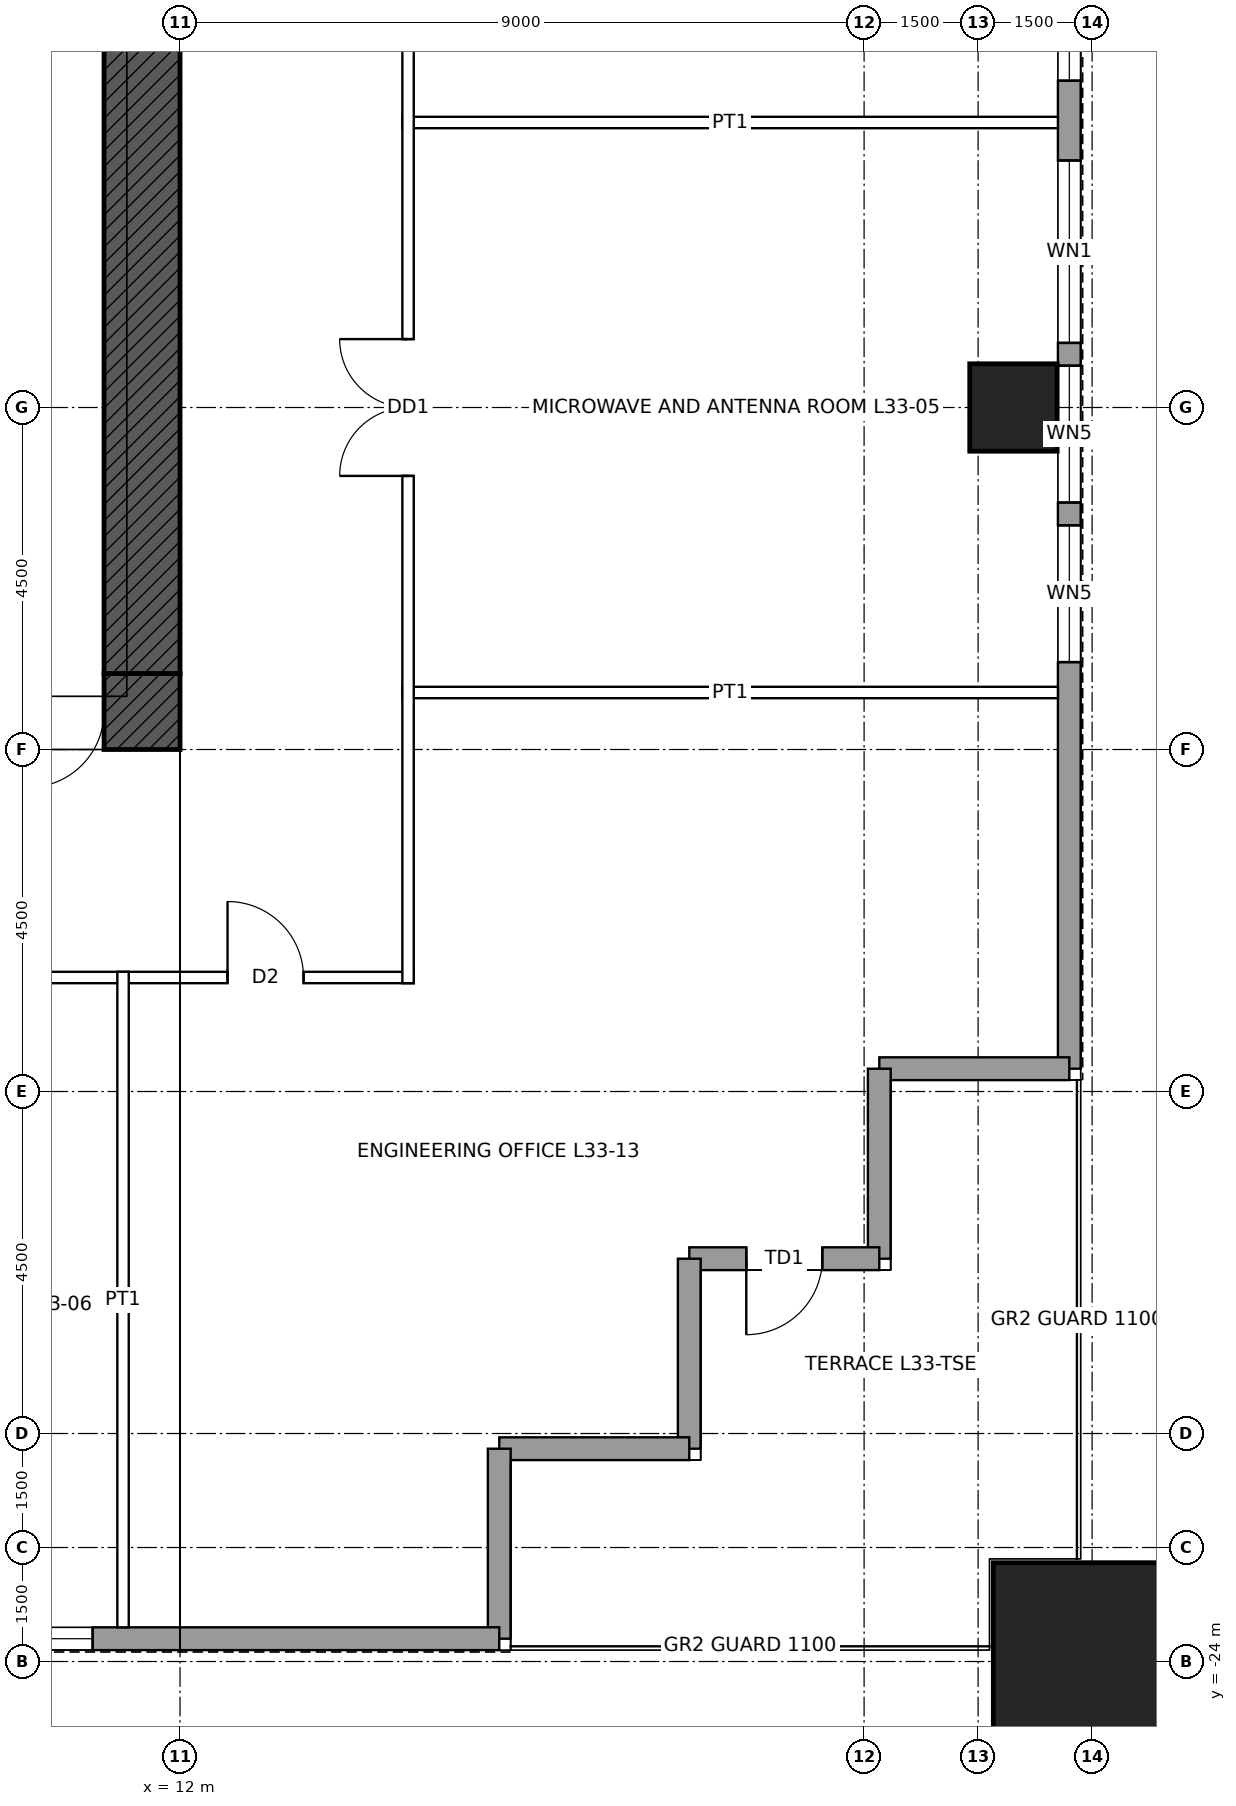
"""IFC4 building model, lengths in metres.
Left out: names, types, materials, properties, quantities, classifications, styles, units other than length and angle.
Written with IfcOpenShell. Run it as: python <this file> out.ifc"""

import sys

from ifc_helpers import new_model, si_unit, direction, frame, frame_2d, origin, origin_2d, place, context, subcontext, project, spatial, rectangle, hollow_rectangle, extrude, element, fill, save


model = new_model("IFC4")
c1 = context("Model", 3, precision=1e-05, world=origin(), true_north=direction((0.0, 1.0)))
c2 = subcontext(c1, "Body", "Model", "MODEL_VIEW")
j1 = project(units=[si_unit("LENGTHUNIT", "METRE"), si_unit("PLANEANGLEUNIT", "RADIAN")], contexts=[c1])
p1 = place(None, origin())
s1 = spatial("IfcSite", under=j1, at=p1, CompositionType="ELEMENT")
p2 = place(p1, origin())
s2 = spatial("IfcBuilding", under=s1, at=p2, CompositionType="ELEMENT")
p3 = place(p2, frame((0.0, 0.0, 162.9)))
s3 = spatial("IfcBuildingStorey", under=s2, at=p3, CompositionType="ELEMENT", Elevation=162.9)
p4 = place(p3, frame((24.0, -24.0, 0.0), z_axis=(0.0, 0.0, 1.0), x_axis=(1.0, 0.0, 0.0)))
e1 = element("IfcColumn", 1, at=p4, inside=s3, PredefinedType="COLUMN", context=c2, shape_type="SweptSolid", body=[
    extrude(hollow_rectangle(XDim=2.6, YDim=2.6, WallThickness=0.13, at=origin_2d()), origin(), (0.0, 0.0, 1.0), 4.5),
])
p5 = place(p3, frame((22.965, -7.5, 0.0), z_axis=(0.0, 0.0, 1.0), x_axis=(1.0, 0.0, 0.0)))
e2 = element("IfcColumn", 2, at=p5, inside=s3, PredefinedType="COLUMN", context=c2, shape_type="SweptSolid", body=[
    extrude(hollow_rectangle(XDim=1.15, YDim=1.15, WallThickness=0.075, at=origin_2d()), origin(), (0.0, 0.0, 1.0), 4.5),
])
p6 = place(p3, frame((12.0, -11.5, 0.0), z_axis=(0.0, 0.0, 1.0), x_axis=(-1.0, 0.0, 0.0)))
e3 = element("IfcWall", 3, at=p6, inside=s3, PredefinedType="SHEAR", context=c2, shape_type="SweptSolid", body=[
    extrude(rectangle(XDim=24.0, YDim=1.0, at=frame_2d((12.0, 0.0))), origin(), (0.0, 0.0, 1.0), 4.5),
])
p7 = place(p6, frame((11.5, 0.0, 0.0)))
e4 = element("IfcOpeningElement", 4, at=p7, cuts=e3, PredefinedType="OPENING", context=c2, shape_type="SweptSolid", body=[
    extrude(rectangle(XDim=1.0, YDim=2.1, at=frame_2d((0.5, 1.05))), frame((0.0, 0.51, 0.0), z_axis=(0.0, -1.0, 0.0), x_axis=(1.0, 0.0, 0.0)), (0.0, 0.0, 1.0), 1.02),
])
p8 = place(p6, frame((1.0, 0.0, 0.0)))
e5 = element("IfcOpeningElement", 5, at=p8, cuts=e3, PredefinedType="OPENING", context=c2, shape_type="SweptSolid", body=[
    extrude(rectangle(XDim=1.0, YDim=2.4, at=frame_2d((0.5, 1.2))), frame((0.0, 0.51, 0.0), z_axis=(0.0, -1.0, 0.0), x_axis=(1.0, 0.0, 0.0)), (0.0, 0.0, 1.0), 1.02),
])
p9 = place(p3, frame((11.5, 11.0, 0.0), z_axis=(0.0, 0.0, 1.0), x_axis=(0.0, -1.0, 0.0)))
e6 = element("IfcWall", 6, at=p9, inside=s3, PredefinedType="SHEAR", context=c2, shape_type="SweptSolid", body=[
    extrude(rectangle(XDim=22.0, YDim=1.0, at=frame_2d((11.0, 0.0))), origin(), (0.0, 0.0, 1.0), 4.5),
])
p10 = place(p9, frame((10.5, 0.0, 0.0)))
e7 = element("IfcOpeningElement", 7, at=p10, cuts=e6, PredefinedType="OPENING", context=c2, shape_type="SweptSolid", body=[
    extrude(rectangle(XDim=1.0, YDim=2.4, at=frame_2d((0.5, 1.2))), frame((0.0, 0.51, 0.0), z_axis=(0.0, -1.0, 0.0), x_axis=(1.0, 0.0, 0.0)), (0.0, 0.0, 1.0), 1.02),
])
p11 = place(p3, frame((23.7, 16.2, 0.0), z_axis=(0.0, 0.0, 1.0), x_axis=(0.0, -1.0, 0.0)))
e8 = element("IfcWall", 8, at=p11, inside=s3, PredefinedType="SOLIDWALL", context=c2, shape_type="SweptSolid", body=[
    extrude(rectangle(XDim=32.4, YDim=0.3, at=frame_2d((16.2, 0.0))), origin(), (0.0, 0.0, 1.0), 4.3),
])
p12 = place(p11, frame((5.35, 0.0, 1.0)))
e9 = element("IfcOpeningElement", 9, at=p12, cuts=e8, PredefinedType="OPENING", context=c2, shape_type="SweptSolid", body=[
    extrude(rectangle(XDim=1.8, YDim=1.2, at=frame_2d((0.9, 0.6))), frame((0.0, 0.16, 0.0), z_axis=(0.0, -1.0, 0.0), x_axis=(1.0, 0.0, 0.0)), (0.0, 0.0, 1.0), 0.32),
])
p13 = place(p11, frame((7.45, 0.0, 1.0)))
e10 = element("IfcOpeningElement", 10, at=p13, cuts=e8, PredefinedType="OPENING", context=c2, shape_type="SweptSolid", body=[
    extrude(rectangle(XDim=2.4, YDim=1.2, at=frame_2d((1.2, 0.6))), frame((0.0, 0.16, 0.0), z_axis=(0.0, -1.0, 0.0), x_axis=(1.0, 0.0, 0.0)), (0.0, 0.0, 1.0), 0.32),
])
p14 = place(p11, frame((10.15, 0.0, 1.0)))
e11 = element("IfcOpeningElement", 11, at=p14, cuts=e8, PredefinedType="OPENING", context=c2, shape_type="SweptSolid", body=[
    extrude(rectangle(XDim=2.4, YDim=1.2, at=frame_2d((1.2, 0.6))), frame((0.0, 0.16, 0.0), z_axis=(0.0, -1.0, 0.0), x_axis=(1.0, 0.0, 0.0)), (0.0, 0.0, 1.0), 0.32),
])
p15 = place(p11, frame((13.0, 0.0, 1.0)))
e12 = element("IfcOpeningElement", 12, at=p15, cuts=e8, PredefinedType="OPENING", context=c2, shape_type="SweptSolid", body=[
    extrude(rectangle(XDim=2.4, YDim=1.2, at=frame_2d((1.2, 0.6))), frame((0.0, 0.16, 0.0), z_axis=(0.0, -1.0, 0.0), x_axis=(1.0, 0.0, 0.0)), (0.0, 0.0, 1.0), 0.32),
])
p16 = place(p11, frame((17.0, 0.0, 1.0)))
e13 = element("IfcOpeningElement", 13, at=p16, cuts=e8, PredefinedType="OPENING", context=c2, shape_type="SweptSolid", body=[
    extrude(rectangle(XDim=2.4, YDim=1.2, at=frame_2d((1.2, 0.6))), frame((0.0, 0.16, 0.0), z_axis=(0.0, -1.0, 0.0), x_axis=(1.0, 0.0, 0.0)), (0.0, 0.0, 1.0), 0.32),
])
p17 = place(p11, frame((20.45, 0.0, 1.0)))
e14 = element("IfcOpeningElement", 14, at=p17, cuts=e8, PredefinedType="OPENING", context=c2, shape_type="SweptSolid", body=[
    extrude(rectangle(XDim=2.4, YDim=1.2, at=frame_2d((1.2, 0.6))), frame((0.0, 0.16, 0.0), z_axis=(0.0, -1.0, 0.0), x_axis=(1.0, 0.0, 0.0)), (0.0, 0.0, 1.0), 0.32),
])
p18 = place(p11, frame((23.15, 0.0, 1.0)))
e15 = element("IfcOpeningElement", 15, at=p18, cuts=e8, PredefinedType="OPENING", context=c2, shape_type="SweptSolid", body=[
    extrude(rectangle(XDim=1.8, YDim=1.2, at=frame_2d((0.9, 0.6))), frame((0.0, 0.16, 0.0), z_axis=(0.0, -1.0, 0.0), x_axis=(1.0, 0.0, 0.0)), (0.0, 0.0, 1.0), 0.32),
])
p19 = place(p11, frame((25.25, 0.0, 1.0)))
e16 = element("IfcOpeningElement", 16, at=p19, cuts=e8, PredefinedType="OPENING", context=c2, shape_type="SweptSolid", body=[
    extrude(rectangle(XDim=1.8, YDim=1.2, at=frame_2d((0.9, 0.6))), frame((0.0, 0.16, 0.0), z_axis=(0.0, -1.0, 0.0), x_axis=(1.0, 0.0, 0.0)), (0.0, 0.0, 1.0), 0.32),
])
for number, where, z_axis, x_axis in (
    (17, (23.7, -16.2, 0.0), (0.0, 0.0, 1.0), (-1.0, 0.0, 0.0)),
    (18, (21.2, -16.2, 0.0), (0.0, 0.0, 1.0), (0.0, -1.0, 0.0)),
):
    element("IfcWall", number, at=place(p3, frame(where, z_axis=z_axis, x_axis=x_axis)), inside=s3, PredefinedType="SOLIDWALL", context=c2, shape_type="SweptSolid", body=[
        extrude(rectangle(XDim=2.5, YDim=0.3, at=frame_2d((1.25, 0.0))), origin(), (0.0, 0.0, 1.0), 4.3),
    ])
p20 = place(p3, frame((21.2, -18.7, 0.0), z_axis=(0.0, 0.0, 1.0), x_axis=(-1.0, 0.0, 0.0)))
e19 = element("IfcWall", 19, at=p20, inside=s3, PredefinedType="SOLIDWALL", context=c2, shape_type="SweptSolid", body=[
    extrude(rectangle(XDim=2.5, YDim=0.3, at=frame_2d((1.25, 0.0))), origin(), (0.0, 0.0, 1.0), 4.3),
])
p21 = place(p20, frame((0.75, 0.0, 0.0)))
e20 = element("IfcOpeningElement", 20, at=p21, cuts=e19, PredefinedType="OPENING", context=c2, shape_type="SweptSolid", body=[
    extrude(rectangle(XDim=1.0, YDim=2.4, at=frame_2d((0.5, 1.2))), frame((0.0, 0.16, 0.0), z_axis=(0.0, -1.0, 0.0), x_axis=(1.0, 0.0, 0.0)), (0.0, 0.0, 1.0), 0.32),
])
for number, where, z_axis, x_axis in (
    (21, (18.7, -18.7, 0.0), (0.0, 0.0, 1.0), (0.0, -1.0, 0.0)),
    (22, (18.7, -21.2, 0.0), (0.0, 0.0, 1.0), (-1.0, 0.0, 0.0)),
    (23, (16.2, -21.2, 0.0), (0.0, 0.0, 1.0), (0.0, -1.0, 0.0)),
):
    element("IfcWall", number, at=place(p3, frame(where, z_axis=z_axis, x_axis=x_axis)), inside=s3, PredefinedType="SOLIDWALL", context=c2, shape_type="SweptSolid", body=[
        extrude(rectangle(XDim=2.5, YDim=0.3, at=frame_2d((1.25, 0.0))), origin(), (0.0, 0.0, 1.0), 4.3),
    ])
p22 = place(p3, frame((16.2, -23.7, 0.0), z_axis=(0.0, 0.0, 1.0), x_axis=(-1.0, 0.0, 0.0)))
e24 = element("IfcWall", 24, at=p22, inside=s3, PredefinedType="SOLIDWALL", context=c2, shape_type="SweptSolid", body=[
    extrude(rectangle(XDim=32.4, YDim=0.3, at=frame_2d((16.2, 0.0))), origin(), (0.0, 0.0, 1.0), 4.3),
])
p23 = place(p22, frame((5.35, 0.0, 1.0)))
e25 = element("IfcOpeningElement", 25, at=p23, cuts=e24, PredefinedType="OPENING", context=c2, shape_type="SweptSolid", body=[
    extrude(rectangle(XDim=1.8, YDim=1.2, at=frame_2d((0.9, 0.6))), frame((0.0, 0.16, 0.0), z_axis=(0.0, -1.0, 0.0), x_axis=(1.0, 0.0, 0.0)), (0.0, 0.0, 1.0), 0.32),
])
p24 = place(p22, frame((7.45, 0.0, 1.0)))
e26 = element("IfcOpeningElement", 26, at=p24, cuts=e24, PredefinedType="OPENING", context=c2, shape_type="SweptSolid", body=[
    extrude(rectangle(XDim=1.8, YDim=1.2, at=frame_2d((0.9, 0.6))), frame((0.0, 0.16, 0.0), z_axis=(0.0, -1.0, 0.0), x_axis=(1.0, 0.0, 0.0)), (0.0, 0.0, 1.0), 0.32),
])
p25 = place(p22, frame((9.55, 0.0, 1.0)))
e27 = element("IfcOpeningElement", 27, at=p25, cuts=e24, PredefinedType="OPENING", context=c2, shape_type="SweptSolid", body=[
    extrude(rectangle(XDim=2.4, YDim=1.2, at=frame_2d((1.2, 0.6))), frame((0.0, 0.16, 0.0), z_axis=(0.0, -1.0, 0.0), x_axis=(1.0, 0.0, 0.0)), (0.0, 0.0, 1.0), 0.32),
])
p26 = place(p22, frame((13.0, 0.0, 1.0)))
e28 = element("IfcOpeningElement", 28, at=p26, cuts=e24, PredefinedType="OPENING", context=c2, shape_type="SweptSolid", body=[
    extrude(rectangle(XDim=2.4, YDim=1.2, at=frame_2d((1.2, 0.6))), frame((0.0, 0.16, 0.0), z_axis=(0.0, -1.0, 0.0), x_axis=(1.0, 0.0, 0.0)), (0.0, 0.0, 1.0), 0.32),
])
p27 = place(p22, frame((17.0, 0.0, 1.0)))
e29 = element("IfcOpeningElement", 29, at=p27, cuts=e24, PredefinedType="OPENING", context=c2, shape_type="SweptSolid", body=[
    extrude(rectangle(XDim=2.4, YDim=1.2, at=frame_2d((1.2, 0.6))), frame((0.0, 0.16, 0.0), z_axis=(0.0, -1.0, 0.0), x_axis=(1.0, 0.0, 0.0)), (0.0, 0.0, 1.0), 0.32),
])
p28 = place(p22, frame((20.45, 0.0, 1.0)))
e30 = element("IfcOpeningElement", 30, at=p28, cuts=e24, PredefinedType="OPENING", context=c2, shape_type="SweptSolid", body=[
    extrude(rectangle(XDim=2.4, YDim=1.2, at=frame_2d((1.2, 0.6))), frame((0.0, 0.16, 0.0), z_axis=(0.0, -1.0, 0.0), x_axis=(1.0, 0.0, 0.0)), (0.0, 0.0, 1.0), 0.32),
])
p29 = place(p22, frame((23.15, 0.0, 1.0)))
e31 = element("IfcOpeningElement", 31, at=p29, cuts=e24, PredefinedType="OPENING", context=c2, shape_type="SweptSolid", body=[
    extrude(rectangle(XDim=1.8, YDim=1.2, at=frame_2d((0.9, 0.6))), frame((0.0, 0.16, 0.0), z_axis=(0.0, -1.0, 0.0), x_axis=(1.0, 0.0, 0.0)), (0.0, 0.0, 1.0), 0.32),
])
p30 = place(p22, frame((25.25, 0.0, 1.0)))
e32 = element("IfcOpeningElement", 32, at=p30, cuts=e24, PredefinedType="OPENING", context=c2, shape_type="SweptSolid", body=[
    extrude(rectangle(XDim=1.8, YDim=1.2, at=frame_2d((0.9, 0.6))), frame((0.0, 0.16, 0.0), z_axis=(0.0, -1.0, 0.0), x_axis=(1.0, 0.0, 0.0)), (0.0, 0.0, 1.0), 0.32),
])
p31 = place(p3, frame((-15.075, -15.0, 0.0), z_axis=(0.0, 0.0, 1.0), x_axis=(1.0, 0.0, 0.0)))
e33 = element("IfcWall", 33, at=p31, inside=s3, PredefinedType="PARTITIONING", context=c2, shape_type="SweptSolid", body=[
    extrude(rectangle(XDim=30.15, YDim=0.15, at=frame_2d((15.075, 0.0))), origin(), (0.0, 0.0, 1.0), 4.3),
])
p32 = place(p31, frame((21.675, 0.0, 0.0)))
e34 = element("IfcOpeningElement", 34, at=p32, cuts=e33, PredefinedType="OPENING", context=c2, shape_type="SweptSolid", body=[
    extrude(rectangle(XDim=1.8, YDim=2.4, at=frame_2d((0.9, 1.2))), frame((0.0, 0.085, 0.0), z_axis=(0.0, -1.0, 0.0), x_axis=(1.0, 0.0, 0.0)), (0.0, 0.0, 1.0), 0.17),
])
p33 = place(p31, frame((14.575, 0.0, 0.0)))
e35 = element("IfcOpeningElement", 35, at=p33, cuts=e33, PredefinedType="OPENING", context=c2, shape_type="SweptSolid", body=[
    extrude(rectangle(XDim=1.0, YDim=2.1, at=frame_2d((0.5, 1.05))), frame((0.0, 0.085, 0.0), z_axis=(0.0, -1.0, 0.0), x_axis=(1.0, 0.0, 0.0)), (0.0, 0.0, 1.0), 0.17),
])
p34 = place(p31, frame((6.675, 0.0, 0.0)))
e36 = element("IfcOpeningElement", 36, at=p34, cuts=e33, PredefinedType="OPENING", context=c2, shape_type="SweptSolid", body=[
    extrude(rectangle(XDim=1.8, YDim=2.4, at=frame_2d((0.9, 1.2))), frame((0.0, 0.085, 0.0), z_axis=(0.0, -1.0, 0.0), x_axis=(1.0, 0.0, 0.0)), (0.0, 0.0, 1.0), 0.17),
])
p35 = place(p31, frame((27.7, 0.0, 0.0)))
e37 = element("IfcOpeningElement", 37, at=p35, cuts=e33, PredefinedType="OPENING", context=c2, shape_type="SweptSolid", body=[
    extrude(rectangle(XDim=1.0, YDim=2.1, at=frame_2d((0.5, 1.05))), frame((0.0, 0.085, 0.0), z_axis=(0.0, -1.0, 0.0), x_axis=(1.0, 0.0, 0.0)), (0.0, 0.0, 1.0), 0.17),
])
p36 = place(p31, frame((1.45, 0.0, 0.0)))
e38 = element("IfcOpeningElement", 38, at=p36, cuts=e33, PredefinedType="OPENING", context=c2, shape_type="SweptSolid", body=[
    extrude(rectangle(XDim=1.0, YDim=2.1, at=frame_2d((0.5, 1.05))), frame((0.0, 0.085, 0.0), z_axis=(0.0, -1.0, 0.0), x_axis=(1.0, 0.0, 0.0)), (0.0, 0.0, 1.0), 0.17),
])
for number, where, z_axis, x_axis in (
    (39, (14.925, -11.25, 0.0), (0.0, 0.0, 1.0), (1.0, 0.0, 0.0)),
    (40, (14.925, -3.75, 0.0), (0.0, 0.0, 1.0), (1.0, 0.0, 0.0)),
    (41, (11.25, -23.55, 0.0), (0.0, 0.0, 1.0), (0.0, 1.0, 0.0)),
):
    element("IfcWall", number, at=place(p3, frame(where, z_axis=z_axis, x_axis=x_axis)), inside=s3, PredefinedType="PARTITIONING", context=c2, shape_type="SweptSolid", body=[
        extrude(rectangle(XDim=8.625, YDim=0.15, at=frame_2d((4.312, 0.0))), origin(), (0.0, 0.0, 1.0), 3.431),
    ])
p37 = place(p3, frame((15.0, -15.075, 0.0), z_axis=(0.0, 0.0, 1.0), x_axis=(0.0, 1.0, 0.0)))
e42 = element("IfcWall", 42, at=p37, inside=s3, PredefinedType="PARTITIONING", context=c2, shape_type="SweptSolid", body=[
    extrude(rectangle(XDim=30.15, YDim=0.15, at=frame_2d((15.075, 0.0))), origin(), (0.0, 0.0, 1.0), 4.3),
])
p38 = place(p37, frame((17.925, 0.0, 0.0)))
e43 = element("IfcOpeningElement", 43, at=p38, cuts=e42, PredefinedType="OPENING", context=c2, shape_type="SweptSolid", body=[
    extrude(rectangle(XDim=1.8, YDim=2.4, at=frame_2d((0.9, 1.2))), frame((0.0, 0.085, 0.0), z_axis=(0.0, -1.0, 0.0), x_axis=(1.0, 0.0, 0.0)), (0.0, 0.0, 1.0), 0.17),
])
p39 = place(p37, frame((6.675, 0.0, 0.0)))
e44 = element("IfcOpeningElement", 44, at=p39, cuts=e42, PredefinedType="OPENING", context=c2, shape_type="SweptSolid", body=[
    extrude(rectangle(XDim=1.8, YDim=2.4, at=frame_2d((0.9, 1.2))), frame((0.0, 0.085, 0.0), z_axis=(0.0, -1.0, 0.0), x_axis=(1.0, 0.0, 0.0)), (0.0, 0.0, 1.0), 0.17),
])
p40 = place(p16, origin())
e45 = element("IfcWindow", 45, at=p40, inside=s3, PartitioningType="SINGLE_PANEL", PredefinedType="WINDOW", context=c2, shape_type="SweptSolid", body=[
    extrude(rectangle(XDim=2.4, YDim=1.2, at=frame_2d((1.2, 0.6))), frame((0.0, 0.03, 0.0), z_axis=(0.0, -1.0, 0.0), x_axis=(1.0, 0.0, 0.0)), (0.0, 0.0, 1.0), 0.06),
])
fill(e13, e45)
p41 = place(p17, origin())
e46 = element("IfcWindow", 46, at=p41, inside=s3, PartitioningType="SINGLE_PANEL", PredefinedType="WINDOW", context=c2, shape_type="SweptSolid", body=[
    extrude(rectangle(XDim=2.4, YDim=1.2, at=frame_2d((1.2, 0.6))), frame((0.0, 0.03, 0.0), z_axis=(0.0, -1.0, 0.0), x_axis=(1.0, 0.0, 0.0)), (0.0, 0.0, 1.0), 0.06),
])
fill(e14, e46)
p42 = place(p18, origin())
e47 = element("IfcWindow", 47, at=p42, inside=s3, PartitioningType="SINGLE_PANEL", PredefinedType="WINDOW", context=c2, shape_type="SweptSolid", body=[
    extrude(rectangle(XDim=1.8, YDim=1.2, at=frame_2d((0.9, 0.6))), frame((0.0, 0.03, 0.0), z_axis=(0.0, -1.0, 0.0), x_axis=(1.0, 0.0, 0.0)), (0.0, 0.0, 1.0), 0.06),
])
fill(e15, e47)
p43 = place(p19, origin())
e48 = element("IfcWindow", 48, at=p43, inside=s3, PartitioningType="SINGLE_PANEL", PredefinedType="WINDOW", context=c2, shape_type="SweptSolid", body=[
    extrude(rectangle(XDim=1.8, YDim=1.2, at=frame_2d((0.9, 0.6))), frame((0.0, 0.03, 0.0), z_axis=(0.0, -1.0, 0.0), x_axis=(1.0, 0.0, 0.0)), (0.0, 0.0, 1.0), 0.06),
])
fill(e16, e48)
p44 = place(p21, origin())
e49 = element("IfcDoor", 49, at=p44, inside=s3, OperationType="SINGLE_SWING_RIGHT", PredefinedType="DOOR", context=c2, shape_type="SweptSolid", body=[
    extrude(rectangle(XDim=1.0, YDim=2.4, at=frame_2d((0.5, 1.2))), frame((0.0, 0.025, 0.0), z_axis=(0.0, -1.0, 0.0), x_axis=(1.0, 0.0, 0.0)), (0.0, 0.0, 1.0), 0.05),
])
fill(e20, e49)
p45 = place(p23, origin())
e50 = element("IfcWindow", 50, at=p45, inside=s3, PartitioningType="SINGLE_PANEL", PredefinedType="WINDOW", context=c2, shape_type="SweptSolid", body=[
    extrude(rectangle(XDim=1.8, YDim=1.2, at=frame_2d((0.9, 0.6))), frame((0.0, 0.03, 0.0), z_axis=(0.0, -1.0, 0.0), x_axis=(1.0, 0.0, 0.0)), (0.0, 0.0, 1.0), 0.06),
])
fill(e25, e50)
p46 = place(p8, origin())
e51 = element("IfcDoor", 51, at=p46, inside=s3, OperationType="SINGLE_SWING_RIGHT", PredefinedType="DOOR", context=c2, shape_type="SweptSolid", body=[
    extrude(rectangle(XDim=1.0, YDim=2.4, at=frame_2d((0.5, 1.2))), frame((0.0, 0.485, 0.0), z_axis=(0.0, -1.0, 0.0), x_axis=(1.0, 0.0, 0.0)), (0.0, 0.0, 1.0), 0.05),
])
fill(e5, e51)
p47 = place(p39, origin())
e52 = element("IfcDoor", 52, at=p47, inside=s3, OperationType="DOUBLE_DOOR_SINGLE_SWING", PredefinedType="DOOR", context=c2, shape_type="SweptSolid", body=[
    extrude(rectangle(XDim=1.8, YDim=2.4, at=frame_2d((0.9, 1.2))), frame((0.0, 0.025, 0.0), z_axis=(0.0, -1.0, 0.0), x_axis=(1.0, 0.0, 0.0)), (0.0, 0.0, 1.0), 0.05),
])
fill(e44, e52)
p48 = place(p35, origin())
e53 = element("IfcDoor", 53, at=p48, inside=s3, OperationType="SINGLE_SWING_LEFT", PredefinedType="DOOR", context=c2, shape_type="SweptSolid", body=[
    extrude(rectangle(XDim=1.0, YDim=2.1, at=frame_2d((0.5, 1.05))), frame((0.0, 0.025, 0.0), z_axis=(0.0, -1.0, 0.0), x_axis=(1.0, 0.0, 0.0)), (0.0, 0.0, 1.0), 0.05),
])
fill(e37, e53)
save(model, sys.argv[1])
